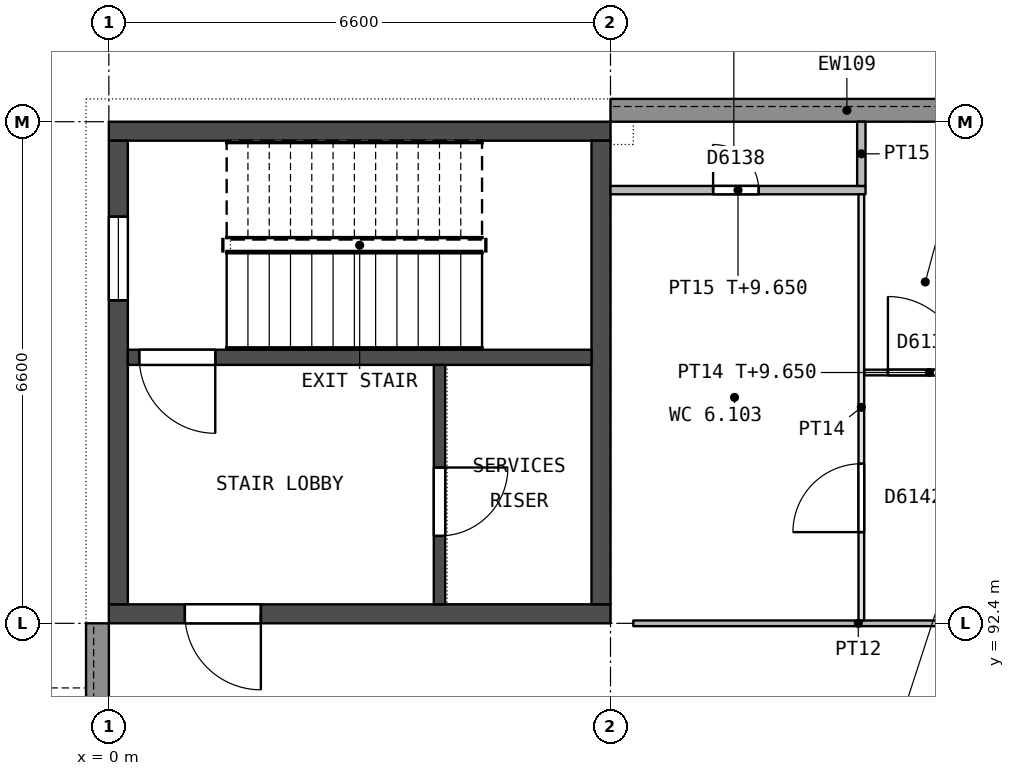
"""IFC4 building model, lengths in metres.
Left out: names, types, materials, properties, quantities, classifications, styles, units other than length and angle.
Written with IfcOpenShell. Run it as: python <this file> out.ifc"""

import sys

from ifc_helpers import new_model, si_unit, direction, frame, frame_2d, origin, place, context, subcontext, project, spatial, rectangle, extrude, element, fill, save


model = new_model("IFC4")
c1 = context("Model", 3, precision=1e-05, world=origin(), true_north=direction((0.0, 1.0)))
c2 = subcontext(c1, "Body", "Model", "MODEL_VIEW")
j1 = project(units=[si_unit("LENGTHUNIT", "METRE"), si_unit("PLANEANGLEUNIT", "RADIAN")], contexts=[c1])
p1 = place(None, origin())
s1 = spatial("IfcSite", under=j1, at=p1, CompositionType="ELEMENT")
p2 = place(p1, origin())
s2 = spatial("IfcBuilding", under=s1, at=p2, CompositionType="ELEMENT")
p3 = place(p2, frame((0.0, 0.0, 5.4)))
s3 = spatial("IfcBuildingStorey", under=s2, at=p3, CompositionType="ELEMENT", Elevation=5.4)
p4 = place(p3, frame((0.0, 92.525, 0.0), z_axis=(0.0, 0.0, 1.0), x_axis=(1.0, 0.0, 0.0)))
e1 = element("IfcWall", 1, at=p4, inside=s3, PredefinedType="SHEAR", context=c2, shape_type="SweptSolid", body=[
    extrude(rectangle(XDim=6.6, YDim=0.25, at=frame_2d((3.3, 0.0))), origin(), (0.0, 0.0, 1.0), 4.25),
])
p5 = place(p4, frame((1.0, 0.0, 0.0)))
e2 = element("IfcOpeningElement", 2, at=p5, cuts=e1, PredefinedType="OPENING", context=c2, shape_type="SweptSolid", body=[
    extrude(rectangle(XDim=1.0, YDim=2.1, at=frame_2d((0.5, 1.05))), frame((0.0, 0.135, 0.0), z_axis=(0.0, -1.0, 0.0), x_axis=(1.0, 0.0, 0.0)), (0.0, 0.0, 1.0), 0.27),
])
p6 = place(p3, frame((0.0, 98.875, 0.0), z_axis=(0.0, 0.0, 1.0), x_axis=(1.0, 0.0, 0.0)))
e3 = element("IfcWall", 3, at=p6, inside=s3, PredefinedType="SHEAR", context=c2, shape_type="SweptSolid", body=[
    extrude(rectangle(XDim=6.6, YDim=0.25, at=frame_2d((3.3, 0.0))), origin(), (0.0, 0.0, 1.0), 4.25),
])
p7 = place(p3, frame((0.125, 92.65, 0.0), z_axis=(0.0, 0.0, 1.0), x_axis=(0.0, 1.0, 0.0)))
e4 = element("IfcWall", 4, at=p7, inside=s3, PredefinedType="SHEAR", context=c2, shape_type="SweptSolid", body=[
    extrude(rectangle(XDim=6.1, YDim=0.25, at=frame_2d((3.05, 0.0))), origin(), (0.0, 0.0, 1.0), 4.25),
])
p8 = place(p7, frame((4.0, 0.0, 0.7)))
e5 = element("IfcOpeningElement", 5, at=p8, cuts=e4, PredefinedType="OPENING", context=c2, shape_type="SweptSolid", body=[
    extrude(rectangle(XDim=1.1, YDim=1.5, at=frame_2d((0.55, 0.75))), frame((0.0, 0.135, 0.0), z_axis=(0.0, -1.0, 0.0), x_axis=(1.0, 0.0, 0.0)), (0.0, 0.0, 1.0), 0.27),
])
p9 = place(p3, frame((6.475, 92.65, 0.0), z_axis=(0.0, 0.0, 1.0), x_axis=(0.0, 1.0, 0.0)))
e6 = element("IfcWall", 6, at=p9, inside=s3, PredefinedType="SHEAR", context=c2, shape_type="SweptSolid", body=[
    extrude(rectangle(XDim=6.1, YDim=0.25, at=frame_2d((3.05, 0.0))), origin(), (0.0, 0.0, 1.0), 4.25),
])
p10 = place(p3, frame((0.25, 95.9, 0.0), z_axis=(0.0, 0.0, 1.0), x_axis=(1.0, 0.0, 0.0)))
e7 = element("IfcWall", 7, at=p10, inside=s3, PredefinedType="SHEAR", context=c2, shape_type="SweptSolid", body=[
    extrude(rectangle(XDim=6.1, YDim=0.2, at=frame_2d((3.05, 0.0))), origin(), (0.0, 0.0, 1.0), 4.25),
])
p11 = place(p10, frame((0.15, 0.0, 0.0)))
e8 = element("IfcOpeningElement", 8, at=p11, cuts=e7, PredefinedType="OPENING", context=c2, shape_type="SweptSolid", body=[
    extrude(rectangle(XDim=1.0, YDim=2.1, at=frame_2d((0.5, 1.05))), frame((0.0, 0.11, 0.0), z_axis=(0.0, -1.0, 0.0), x_axis=(1.0, 0.0, 0.0)), (0.0, 0.0, 1.0), 0.22),
])
p12 = place(p3, frame((4.35, 92.65, 0.0), z_axis=(0.0, 0.0, 1.0), x_axis=(0.0, 1.0, 0.0)))
e9 = element("IfcWall", 9, at=p12, inside=s3, PredefinedType="SHEAR", context=c2, shape_type="SweptSolid", body=[
    extrude(rectangle(XDim=3.15, YDim=0.15, at=frame_2d((1.575, 0.0))), origin(), (0.0, 0.0, 1.0), 4.25),
])
p13 = place(p12, frame((0.9, 0.0, 0.0)))
e10 = element("IfcOpeningElement", 10, at=p13, cuts=e9, PredefinedType="OPENING", context=c2, shape_type="SweptSolid", body=[
    extrude(rectangle(XDim=0.9, YDim=2.1, at=frame_2d((0.45, 1.05))), frame((0.0, 0.085, 0.0), z_axis=(0.0, -1.0, 0.0), x_axis=(1.0, 0.0, 0.0)), (0.0, 0.0, 1.0), 0.17),
])
p14 = place(p3, frame((6.6, 99.15, 0.0), z_axis=(0.0, 0.0, 1.0), x_axis=(1.0, 0.0, 0.0)))
e11 = element("IfcWall", 11, at=p14, inside=s3, PredefinedType="STANDARD", context=c2, shape_type="SweptSolid", body=[
    extrude(rectangle(XDim=6.3, YDim=0.3, at=frame_2d((3.15, 0.0))), origin(), (0.0, 0.0, 1.0), 3.65),
])
p15 = place(p3, frame((-0.15, 89.3, 0.0), z_axis=(0.0, 0.0, 1.0), x_axis=(0.0, 1.0, 0.0)))
e12 = element("IfcWall", 12, at=p15, inside=s3, PredefinedType="STANDARD", context=c2, shape_type="SweptSolid", body=[
    extrude(rectangle(XDim=3.1, YDim=0.3, at=frame_2d((1.55, 0.0))), origin(), (0.0, 0.0, 1.0), 3.65),
])
p16 = place(p15, frame((0.85, 0.0, 1.1)))
e13 = element("IfcOpeningElement", 13, at=p16, cuts=e12, PredefinedType="OPENING", context=c2, shape_type="SweptSolid", body=[
    extrude(rectangle(XDim=1.2, YDim=1.2, at=frame_2d((0.6, 0.6))), frame((0.0, 0.16, 0.0), z_axis=(0.0, -1.0, 0.0), x_axis=(1.0, 0.0, 0.0)), (0.0, 0.0, 1.0), 0.32),
])
p17 = place(p3, frame((6.9, 92.4, 0.0), z_axis=(0.0, 0.0, 1.0), x_axis=(1.0, 0.0, 0.0)))
e14 = element("IfcWall", 14, at=p17, inside=s3, PredefinedType="PARTITIONING", context=c2, shape_type="SweptSolid", body=[
    extrude(rectangle(XDim=6.0, YDim=0.075, at=frame_2d((3.0, 0.0))), origin(), (0.0, 0.0, 1.0), 3.65),
])
p18 = place(p17, frame((4.2, 0.0, 0.0)))
e15 = element("IfcOpeningElement", 15, at=p18, cuts=e14, PredefinedType="OPENING", context=c2, shape_type="SweptSolid", body=[
    extrude(rectangle(XDim=0.9, YDim=2.1, at=frame_2d((0.45, 1.05))), frame((0.0, 0.047, 0.0), z_axis=(0.0, -1.0, 0.0), x_axis=(1.0, 0.0, 0.0)), (0.0, 0.0, 1.0), 0.095),
])
p19 = place(p3, frame((11.655, 95.7, 0.0), z_axis=(0.0, 0.0, 1.0), x_axis=(-1.0, 0.0, 0.0)))
e16 = element("IfcWall", 16, at=p19, inside=s3, PredefinedType="PARTITIONING", context=c2, shape_type="SweptSolid", body=[
    extrude(rectangle(XDim=1.717, YDim=0.075, at=frame_2d((0.858, 0.0))), origin(), (0.0, 0.0, 1.0), 4.25),
])
p20 = place(p19, frame((0.405, 0.0, 0.0)))
e17 = element("IfcOpeningElement", 17, at=p20, cuts=e16, PredefinedType="OPENING", context=c2, shape_type="SweptSolid", body=[
    extrude(rectangle(XDim=1.0, YDim=2.1, at=frame_2d((0.5, 1.05))), frame((0.0, 0.047, 0.0), z_axis=(0.0, -1.0, 0.0), x_axis=(1.0, 0.0, 0.0)), (0.0, 0.0, 1.0), 0.095),
])
p21 = place(p3, frame((9.955, 98.1, 0.0), z_axis=(0.0, 0.0, 1.0), x_axis=(-1.0, 0.0, 0.0)))
e18 = element("IfcWall", 18, at=p21, inside=s3, PredefinedType="PARTITIONING", context=c2, shape_type="SweptSolid", body=[
    extrude(rectangle(XDim=3.355, YDim=0.11, at=frame_2d((1.677, 0.0))), origin(), (0.0, 0.0, 1.0), 4.25),
])
p22 = place(p21, frame((1.405, 0.0, 0.0)))
e19 = element("IfcOpeningElement", 19, at=p22, cuts=e18, PredefinedType="OPENING", context=c2, shape_type="SweptSolid", body=[
    extrude(rectangle(XDim=0.6, YDim=2.1, at=frame_2d((0.3, 1.05))), frame((0.0, 0.065, 0.0), z_axis=(0.0, -1.0, 0.0), x_axis=(1.0, 0.0, 0.0)), (0.0, 0.0, 1.0), 0.13),
])
p23 = place(p3, frame((9.9, 92.438, 0.0), z_axis=(0.0, 0.0, 1.0), x_axis=(0.0, 1.0, 0.0)))
e20 = element("IfcWall", 20, at=p23, inside=s3, PredefinedType="PARTITIONING", context=c2, shape_type="SweptSolid", body=[
    extrude(rectangle(XDim=5.607, YDim=0.075, at=frame_2d((2.803, 0.0))), origin(), (0.0, 0.0, 1.0), 3.65),
])
p24 = place(p23, frame((1.162, 0.0, 0.0)))
e21 = element("IfcOpeningElement", 21, at=p24, cuts=e20, PredefinedType="OPENING", context=c2, shape_type="SweptSolid", body=[
    extrude(rectangle(XDim=0.9, YDim=2.1, at=frame_2d((0.45, 1.05))), frame((0.0, 0.047, 0.0), z_axis=(0.0, -1.0, 0.0), x_axis=(1.0, 0.0, 0.0)), (0.0, 0.0, 1.0), 0.095),
])
p25 = place(p3, frame((9.9, 98.155, 0.0), z_axis=(0.0, 0.0, 1.0), x_axis=(0.0, 1.0, 0.0)))
e22 = element("IfcWall", 22, at=p25, inside=s3, PredefinedType="PARTITIONING", context=c2, shape_type="SweptSolid", body=[
    extrude(rectangle(XDim=0.845, YDim=0.11, at=frame_2d((0.422, 0.0))), origin(), (0.0, 0.0, 1.0), 3.65),
])
p26 = place(p13, origin())
e23 = element("IfcDoor", 23, at=p26, inside=s3, OperationType="SINGLE_SWING_RIGHT", PredefinedType="DOOR", context=c2, shape_type="SweptSolid", body=[
    extrude(rectangle(XDim=0.9, YDim=2.1, at=frame_2d((0.45, 1.05))), frame((0.0, 0.025, 0.0), z_axis=(0.0, -1.0, 0.0), x_axis=(1.0, 0.0, 0.0)), (0.0, 0.0, 1.0), 0.05),
])
fill(e10, e23)
p27 = place(p5, origin())
e24 = element("IfcDoor", 24, at=p27, inside=s3, OperationType="SINGLE_SWING_RIGHT", PredefinedType="DOOR", context=c2, shape_type="SweptSolid", body=[
    extrude(rectangle(XDim=1.0, YDim=2.1, at=frame_2d((0.5, 1.05))), frame((0.0, 0.025, 0.0), z_axis=(0.0, -1.0, 0.0), x_axis=(1.0, 0.0, 0.0)), (0.0, 0.0, 1.0), 0.05),
])
fill(e2, e24)
p28 = place(p11, origin())
e25 = element("IfcDoor", 25, at=p28, inside=s3, OperationType="SINGLE_SWING_RIGHT", PredefinedType="DOOR", context=c2, shape_type="SweptSolid", body=[
    extrude(rectangle(XDim=1.0, YDim=2.1, at=frame_2d((0.5, 1.05))), frame((0.0, 0.025, 0.0), z_axis=(0.0, -1.0, 0.0), x_axis=(1.0, 0.0, 0.0)), (0.0, 0.0, 1.0), 0.05),
])
fill(e8, e25)
p29 = place(p8, origin())
e26 = element("IfcWindow", 26, at=p29, inside=s3, PartitioningType="SINGLE_PANEL", PredefinedType="WINDOW", context=c2, shape_type="SweptSolid", body=[
    extrude(rectangle(XDim=1.1, YDim=1.5, at=frame_2d((0.55, 0.75))), frame((0.0, 0.03, 0.0), z_axis=(0.0, -1.0, 0.0), x_axis=(1.0, 0.0, 0.0)), (0.0, 0.0, 1.0), 0.06),
])
fill(e5, e26)
p30 = place(p20, origin())
e27 = element("IfcDoor", 27, at=p30, inside=s3, OperationType="SINGLE_SWING_RIGHT", PredefinedType="DOOR", context=c2, shape_type="SweptSolid", body=[
    extrude(rectangle(XDim=1.0, YDim=2.1, at=frame_2d((0.5, 1.05))), frame((0.0, 0.025, 0.0), z_axis=(0.0, -1.0, 0.0), x_axis=(1.0, 0.0, 0.0)), (0.0, 0.0, 1.0), 0.05),
])
fill(e17, e27)
p31 = place(p22, origin())
e28 = element("IfcDoor", 28, at=p31, inside=s3, OperationType="SINGLE_SWING_RIGHT", PredefinedType="DOOR", context=c2, shape_type="SweptSolid", body=[
    extrude(rectangle(XDim=0.6, YDim=2.1, at=frame_2d((0.3, 1.05))), frame((0.0, 0.025, 0.0), z_axis=(0.0, -1.0, 0.0), x_axis=(1.0, 0.0, 0.0)), (0.0, 0.0, 1.0), 0.05),
])
fill(e19, e28)
p32 = place(p24, origin())
e29 = element("IfcDoor", 29, at=p32, inside=s3, OperationType="SINGLE_SWING_LEFT", PredefinedType="DOOR", context=c2, shape_type="SweptSolid", body=[
    extrude(rectangle(XDim=0.9, YDim=2.1, at=frame_2d((0.45, 1.05))), frame((0.0, 0.025, 0.0), z_axis=(0.0, -1.0, 0.0), x_axis=(1.0, 0.0, 0.0)), (0.0, 0.0, 1.0), 0.05),
])
fill(e21, e29)
save(model, sys.argv[1])
